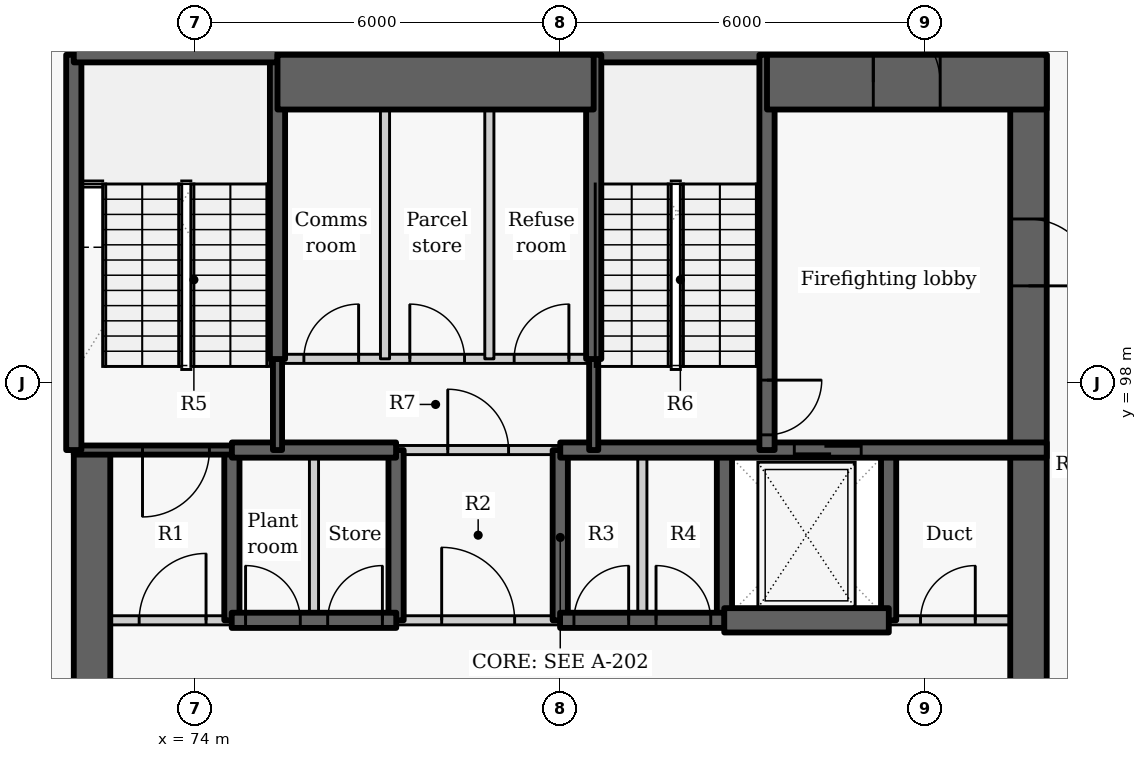
"""IFC4 building model, lengths in metres.
Left out: names, types, materials, properties, quantities, classifications, styles, units other than length and angle.
Written with IfcOpenShell. Run it as: python <this file> out.ifc"""

import sys

from ifc_helpers import new_model, si_unit, direction, frame, frame_2d, origin, place, context, subcontext, project, spatial, rectangle, extrude, element, fill, save


model = new_model("IFC4")
c1 = context("Model", 3, precision=1e-05, world=origin(), true_north=direction((0.0, 1.0)))
c2 = subcontext(c1, "Body", "Model", "MODEL_VIEW")
j1 = project(units=[si_unit("LENGTHUNIT", "METRE"), si_unit("PLANEANGLEUNIT", "RADIAN")], contexts=[c1])
p1 = place(None, origin())
s1 = spatial("IfcSite", under=j1, at=p1, CompositionType="ELEMENT")
p2 = place(p1, origin())
s2 = spatial("IfcBuilding", under=s1, at=p2, CompositionType="ELEMENT")
p3 = place(p2, frame((0.0, 0.0, 6.6)))
s3 = spatial("IfcBuildingStorey", under=s2, at=p3, CompositionType="ELEMENT", Elevation=6.6)
p4 = place(p3, frame((74.6, 94.1, -0.3), z_axis=(0.0, 0.0, 1.0), x_axis=(0.0, 1.0, 0.0)))
e1 = element("IfcWall", 1, at=p4, inside=s3, PredefinedType="SHEAR", context=c2, shape_type="SweptSolid", body=[
    extrude(rectangle(XDim=2.8, YDim=0.25, at=frame_2d((1.4, 0.0))), origin(), (0.0, 0.0, 1.0), 4.8),
])
p5 = place(p3, frame((72.3, 87.8, -0.3), z_axis=(0.0, 0.0, 1.0), x_axis=(0.0, 1.0, 0.0)))
e2 = element("IfcWall", 2, at=p5, inside=s3, PredefinedType="SHEAR", context=c2, shape_type="SweptSolid", body=[
    extrude(rectangle(XDim=9.1, YDim=0.6, at=frame_2d((4.55, 0.0))), origin(), (0.0, 0.0, 1.0), 4.8),
])
for number, where, z_axis, x_axis in (
    (3, (77.3, 94.1, -0.3), (0.0, 0.0, 1.0), (0.0, 1.0, 0.0)),
    (4, (80.0, 94.1, -0.3), (0.0, 0.0, 1.0), (0.0, 1.0, 0.0)),
    (5, (82.7, 94.1, -0.3), (0.0, 0.0, 1.0), (0.0, 1.0, 0.0)),
    (6, (85.4, 94.1, -0.3), (0.0, 0.0, 1.0), (0.0, 1.0, 0.0)),
):
    element("IfcWall", number, at=place(p3, frame(where, z_axis=z_axis, x_axis=x_axis)), inside=s3, PredefinedType="SHEAR", context=c2, shape_type="SweptSolid", body=[
        extrude(rectangle(XDim=2.8, YDim=0.25, at=frame_2d((1.4, 0.0))), origin(), (0.0, 0.0, 1.0), 4.8),
    ])
p6 = place(p3, frame((87.7, 103.4, -0.3), z_axis=(0.0, 0.0, 1.0), x_axis=(0.0, -1.0, 0.0)))
e7 = element("IfcWall", 7, at=p6, inside=s3, PredefinedType="SHEAR", context=c2, shape_type="SweptSolid", body=[
    extrude(rectangle(XDim=15.6, YDim=0.6, at=frame_2d((7.8, 0.0))), origin(), (0.0, 0.0, 1.0), 4.8),
])
p7 = place(p6, frame((2.7, 0.0, 0.3)))
e8 = element("IfcOpeningElement", 8, at=p7, cuts=e7, PredefinedType="OPENING", context=c2, shape_type="SweptSolid", body=[
    extrude(rectangle(XDim=1.1, YDim=2.1, at=frame_2d((0.55, 1.05))), frame((0.0, 0.31, 0.0), z_axis=(0.0, -1.0, 0.0), x_axis=(1.0, 0.0, 0.0)), (0.0, 0.0, 1.0), 0.62),
])
p8 = place(p3, frame((72.0, 94.1, 0.0), z_axis=(0.0, 0.0, 1.0), x_axis=(1.0, 0.0, 0.0)))
e9 = element("IfcWall", 9, at=p8, inside=s3, PredefinedType="PARTITIONING", context=c2, shape_type="SweptSolid", body=[
    extrude(rectangle(XDim=2.603, YDim=0.15, at=frame_2d((1.302, 0.0))), origin(), (0.0, 0.0, 1.0), 4.5),
])
p9 = place(p8, frame((1.075, 0.0, 0.0)))
e10 = element("IfcOpeningElement", 10, at=p9, cuts=e9, PredefinedType="OPENING", context=c2, shape_type="SweptSolid", body=[
    extrude(rectangle(XDim=1.1, YDim=2.1, at=frame_2d((0.55, 1.05))), frame((0.0, 0.085, 0.0), z_axis=(0.0, -1.0, 0.0), x_axis=(1.0, 0.0, 0.0)), (0.0, 0.0, 1.0), 0.17),
])
p10 = place(p3, frame((77.297, 94.1, 0.0), z_axis=(0.0, 0.0, 1.0), x_axis=(1.0, 0.0, 0.0)))
e11 = element("IfcWall", 11, at=p10, inside=s3, PredefinedType="PARTITIONING", context=c2, shape_type="SweptSolid", body=[
    extrude(rectangle(XDim=2.706, YDim=0.15, at=frame_2d((1.353, 0.0))), origin(), (0.0, 0.0, 1.0), 4.5),
])
p11 = place(p10, frame((0.753, 0.0, 0.0)))
e12 = element("IfcOpeningElement", 12, at=p11, cuts=e11, PredefinedType="OPENING", context=c2, shape_type="SweptSolid", body=[
    extrude(rectangle(XDim=1.2, YDim=2.1, at=frame_2d((0.6, 1.05))), frame((0.0, 0.085, 0.0), z_axis=(0.0, -1.0, 0.0), x_axis=(1.0, 0.0, 0.0)), (0.0, 0.0, 1.0), 0.17),
])
p12 = place(p3, frame((85.397, 94.1, 0.0), z_axis=(0.0, 0.0, 1.0), x_axis=(1.0, 0.0, 0.0)))
e13 = element("IfcWall", 13, at=p12, inside=s3, PredefinedType="PARTITIONING", context=c2, shape_type="SweptSolid", body=[
    extrude(rectangle(XDim=2.603, YDim=0.15, at=frame_2d((1.302, 0.0))), origin(), (0.0, 0.0, 1.0), 4.5),
])
p13 = place(p12, frame((0.528, 0.0, 0.0)))
e14 = element("IfcOpeningElement", 14, at=p13, cuts=e13, PredefinedType="OPENING", context=c2, shape_type="SweptSolid", body=[
    extrude(rectangle(XDim=0.9, YDim=2.1, at=frame_2d((0.45, 1.05))), frame((0.0, 0.085, 0.0), z_axis=(0.0, -1.0, 0.0), x_axis=(1.0, 0.0, 0.0)), (0.0, 0.0, 1.0), 0.17),
])
p14 = place(p3, frame((74.597, 94.1, -0.3), z_axis=(0.0, 0.0, 1.0), x_axis=(1.0, 0.0, 0.0)))
e15 = element("IfcWall", 15, at=p14, inside=s3, PredefinedType="SHEAR", context=c2, shape_type="SweptSolid", body=[
    extrude(rectangle(XDim=2.706, YDim=0.25, at=frame_2d((1.353, 0.0))), origin(), (0.0, 0.0, 1.0), 4.8),
])
p15 = place(p14, frame((0.228, 0.0, 0.3)))
e16 = element("IfcOpeningElement", 16, at=p15, cuts=e15, PredefinedType="OPENING", context=c2, shape_type="SweptSolid", body=[
    extrude(rectangle(XDim=0.9, YDim=2.1, at=frame_2d((0.45, 1.05))), frame((0.0, 0.135, 0.0), z_axis=(0.0, -1.0, 0.0), x_axis=(1.0, 0.0, 0.0)), (0.0, 0.0, 1.0), 0.27),
])
p16 = place(p14, frame((1.578, 0.0, 0.3)))
e17 = element("IfcOpeningElement", 17, at=p16, cuts=e15, PredefinedType="OPENING", context=c2, shape_type="SweptSolid", body=[
    extrude(rectangle(XDim=0.9, YDim=2.1, at=frame_2d((0.45, 1.05))), frame((0.0, 0.135, 0.0), z_axis=(0.0, -1.0, 0.0), x_axis=(1.0, 0.0, 0.0)), (0.0, 0.0, 1.0), 0.27),
])
p17 = place(p3, frame((79.997, 94.1, -0.3), z_axis=(0.0, 0.0, 1.0), x_axis=(1.0, 0.0, 0.0)))
e18 = element("IfcWall", 18, at=p17, inside=s3, PredefinedType="SHEAR", context=c2, shape_type="SweptSolid", body=[
    extrude(rectangle(XDim=2.706, YDim=0.25, at=frame_2d((1.353, 0.0))), origin(), (0.0, 0.0, 1.0), 4.8),
])
p18 = place(p17, frame((0.228, 0.0, 0.3)))
e19 = element("IfcOpeningElement", 19, at=p18, cuts=e18, PredefinedType="OPENING", context=c2, shape_type="SweptSolid", body=[
    extrude(rectangle(XDim=0.9, YDim=2.1, at=frame_2d((0.45, 1.05))), frame((0.0, 0.135, 0.0), z_axis=(0.0, -1.0, 0.0), x_axis=(1.0, 0.0, 0.0)), (0.0, 0.0, 1.0), 0.27),
])
p19 = place(p17, frame((1.578, 0.0, 0.3)))
e20 = element("IfcOpeningElement", 20, at=p19, cuts=e18, PredefinedType="OPENING", context=c2, shape_type="SweptSolid", body=[
    extrude(rectangle(XDim=0.9, YDim=2.1, at=frame_2d((0.45, 1.05))), frame((0.0, 0.135, 0.0), z_axis=(0.0, -1.0, 0.0), x_axis=(1.0, 0.0, 0.0)), (0.0, 0.0, 1.0), 0.27),
])
p20 = place(p3, frame((82.697, 94.1, -0.3), z_axis=(0.0, 0.0, 1.0), x_axis=(1.0, 0.0, 0.0)))
e21 = element("IfcWall", 21, at=p20, inside=s3, PredefinedType="SHEAR", context=c2, shape_type="SweptSolid", body=[
    extrude(rectangle(XDim=2.706, YDim=0.4, at=frame_2d((1.353, 0.0))), origin(), (0.0, 0.0, 1.0), 4.8),
])
p21 = place(p3, frame((74.6, 96.9, -0.3), z_axis=(0.0, 0.0, 1.0), x_axis=(-1.0, 0.0, 0.0)))
e22 = element("IfcWall", 22, at=p21, inside=s3, PredefinedType="SHEAR", context=c2, shape_type="SweptSolid", body=[
    extrude(rectangle(XDim=2.6, YDim=0.15, at=frame_2d((1.3, 0.0))), origin(), (0.0, 0.0, 1.0), 4.8),
])
p22 = place(p21, frame((0.37, 0.0, 0.3)))
e23 = element("IfcOpeningElement", 23, at=p22, cuts=e22, PredefinedType="OPENING", context=c2, shape_type="SweptSolid", body=[
    extrude(rectangle(XDim=1.1, YDim=2.1, at=frame_2d((0.55, 1.05))), frame((0.0, 0.085, 0.0), z_axis=(0.0, -1.0, 0.0), x_axis=(1.0, 0.0, 0.0)), (0.0, 0.0, 1.0), 0.17),
])
p23 = place(p3, frame((75.95, 94.1, 0.0), z_axis=(0.0, 0.0, 1.0), x_axis=(0.0, 1.0, 0.0)))
e24 = element("IfcWall", 24, at=p23, inside=s3, PredefinedType="PARTITIONING", context=c2, shape_type="SweptSolid", body=[
    extrude(rectangle(XDim=2.8, YDim=0.15, at=frame_2d((1.4, 0.0))), origin(), (0.0, 0.0, 1.0), 4.5),
])
p24 = place(p3, frame((74.6, 96.9, -0.3), z_axis=(0.0, 0.0, 1.0), x_axis=(1.0, 0.0, 0.0)))
e25 = element("IfcWall", 25, at=p24, inside=s3, PredefinedType="SHEAR", context=c2, shape_type="SweptSolid", body=[
    extrude(rectangle(XDim=2.7, YDim=0.25, at=frame_2d((1.35, 0.0))), origin(), (0.0, 0.0, 1.0), 4.8),
])
p25 = place(p3, frame((80.0, 96.9, -0.3), z_axis=(0.0, 0.0, 1.0), x_axis=(1.0, 0.0, 0.0)))
e26 = element("IfcWall", 26, at=p25, inside=s3, PredefinedType="SHEAR", context=c2, shape_type="SweptSolid", body=[
    extrude(rectangle(XDim=8.0, YDim=0.25, at=frame_2d((4.0, 0.0))), origin(), (0.0, 0.0, 1.0), 4.8),
])
p26 = place(p25, frame((3.849, 0.0, 0.3)))
e27 = element("IfcOpeningElement", 27, at=p26, cuts=e26, PredefinedType="OPENING", context=c2, shape_type="SweptSolid", body=[
    extrude(rectangle(XDim=1.1, YDim=2.1, at=frame_2d((0.55, 1.05))), frame((0.0, 0.135, 0.0), z_axis=(0.0, -1.0, 0.0), x_axis=(1.0, 0.0, 0.0)), (0.0, 0.0, 1.0), 0.27),
])
p27 = place(p3, frame((77.3, 96.9, 0.0), z_axis=(0.0, 0.0, 1.0), x_axis=(1.0, 0.0, 0.0)))
e28 = element("IfcWall", 28, at=p27, inside=s3, PredefinedType="PARTITIONING", context=c2, shape_type="SweptSolid", body=[
    extrude(rectangle(XDim=2.7, YDim=0.15, at=frame_2d((1.35, 0.0))), origin(), (0.0, 0.0, 1.0), 4.5),
])
p28 = place(p27, frame((0.85, 0.0, 0.0)))
e29 = element("IfcOpeningElement", 29, at=p28, cuts=e28, PredefinedType="OPENING", context=c2, shape_type="SweptSolid", body=[
    extrude(rectangle(XDim=1.0, YDim=2.1, at=frame_2d((0.5, 1.05))), frame((0.0, 0.085, 0.0), z_axis=(0.0, -1.0, 0.0), x_axis=(1.0, 0.0, 0.0)), (0.0, 0.0, 1.0), 0.17),
])
p29 = place(p3, frame((81.35, 94.1, 0.0), z_axis=(0.0, 0.0, 1.0), x_axis=(0.0, 1.0, 0.0)))
e30 = element("IfcWall", 30, at=p29, inside=s3, PredefinedType="PARTITIONING", context=c2, shape_type="SweptSolid", body=[
    extrude(rectangle(XDim=2.8, YDim=0.15, at=frame_2d((1.4, 0.0))), origin(), (0.0, 0.0, 1.0), 4.5),
])
p30 = place(p3, frame((75.35, 96.9, -0.3), z_axis=(0.0, 0.0, 1.0), x_axis=(0.0, 1.0, 0.0)))
e31 = element("IfcWall", 31, at=p30, inside=s3, PredefinedType="SHEAR", context=c2, shape_type="SweptSolid", body=[
    extrude(rectangle(XDim=1.503, YDim=0.15, at=frame_2d((0.751, 0.0))), origin(), (0.0, 0.0, 1.0), 4.8),
])
p31 = place(p3, frame((75.35, 98.397, -0.3), z_axis=(0.0, 0.0, 1.0), x_axis=(0.0, 1.0, 0.0)))
e32 = element("IfcWall", 32, at=p31, inside=s3, PredefinedType="SHEAR", context=c2, shape_type="SweptSolid", body=[
    extrude(rectangle(XDim=5.003, YDim=0.25, at=frame_2d((2.501, 0.0))), origin(), (0.0, 0.0, 1.0), 4.8),
])
p32 = place(p3, frame((72.0, 96.9, -0.3), z_axis=(0.0, 0.0, 1.0), x_axis=(0.0, 1.0, 0.0)))
e33 = element("IfcWall", 33, at=p32, inside=s3, PredefinedType="SHEAR", context=c2, shape_type="SweptSolid", body=[
    extrude(rectangle(XDim=6.5, YDim=0.25, at=frame_2d((3.25, 0.0))), origin(), (0.0, 0.0, 1.0), 4.8),
])
p33 = place(p3, frame((72.0, 103.4, -0.3), z_axis=(0.0, 0.0, 1.0), x_axis=(1.0, 0.0, 0.0)))
e34 = element("IfcWall", 34, at=p33, inside=s3, PredefinedType="SHEAR", context=c2, shape_type="SweptSolid", body=[
    extrude(rectangle(XDim=3.35, YDim=0.25, at=frame_2d((1.675, 0.0))), origin(), (0.0, 0.0, 1.0), 4.8),
])
p34 = place(p3, frame((80.55, 103.4, -0.3), z_axis=(0.0, 0.0, 1.0), x_axis=(1.0, 0.0, 0.0)))
e35 = element("IfcWall", 35, at=p34, inside=s3, PredefinedType="SHEAR", context=c2, shape_type="SweptSolid", body=[
    extrude(rectangle(XDim=2.85, YDim=0.25, at=frame_2d((1.425, 0.0))), origin(), (0.0, 0.0, 1.0), 4.8),
])
p35 = place(p3, frame((83.4, 103.4, -0.3), z_axis=(0.0, 0.0, 1.0), x_axis=(0.0, -1.0, 0.0)))
e36 = element("IfcWall", 36, at=p35, inside=s3, PredefinedType="SHEAR", context=c2, shape_type="SweptSolid", body=[
    extrude(rectangle(XDim=6.5, YDim=0.25, at=frame_2d((3.25, 0.0))), origin(), (0.0, 0.0, 1.0), 4.8),
])
p36 = place(p35, frame((5.35, 0.0, 0.3)))
e37 = element("IfcOpeningElement", 37, at=p36, cuts=e36, PredefinedType="OPENING", context=c2, shape_type="SweptSolid", body=[
    extrude(rectangle(XDim=0.9, YDim=2.1, at=frame_2d((0.45, 1.05))), frame((0.0, 0.135, 0.0), z_axis=(0.0, -1.0, 0.0), x_axis=(1.0, 0.0, 0.0)), (0.0, 0.0, 1.0), 0.27),
])
p37 = place(p3, frame((80.55, 96.9, -0.3), z_axis=(0.0, 0.0, 1.0), x_axis=(0.0, 1.0, 0.0)))
e38 = element("IfcWall", 38, at=p37, inside=s3, PredefinedType="SHEAR", context=c2, shape_type="SweptSolid", body=[
    extrude(rectangle(XDim=1.503, YDim=0.15, at=frame_2d((0.751, 0.0))), origin(), (0.0, 0.0, 1.0), 4.8),
])
p38 = place(p3, frame((80.55, 98.397, -0.3), z_axis=(0.0, 0.0, 1.0), x_axis=(0.0, 1.0, 0.0)))
e39 = element("IfcWall", 39, at=p38, inside=s3, PredefinedType="SHEAR", context=c2, shape_type="SweptSolid", body=[
    extrude(rectangle(XDim=5.003, YDim=0.25, at=frame_2d((2.501, 0.0))), origin(), (0.0, 0.0, 1.0), 4.8),
])
p39 = place(p3, frame((75.35, 102.95, -0.3), z_axis=(0.0, 0.0, 1.0), x_axis=(1.0, 0.0, 0.0)))
e40 = element("IfcWall", 40, at=p39, inside=s3, PredefinedType="SHEAR", context=c2, shape_type="SweptSolid", body=[
    extrude(rectangle(XDim=5.2, YDim=0.9, at=frame_2d((2.6, 0.0))), origin(), (0.0, 0.0, 1.0), 4.8),
])
p40 = place(p3, frame((83.4, 102.95, -0.3), z_axis=(0.0, 0.0, 1.0), x_axis=(1.0, 0.0, 0.0)))
e41 = element("IfcWall", 41, at=p40, inside=s3, PredefinedType="SHEAR", context=c2, shape_type="SweptSolid", body=[
    extrude(rectangle(XDim=4.6, YDim=0.9, at=frame_2d((2.3, 0.0))), origin(), (0.0, 0.0, 1.0), 4.8),
])
p41 = place(p40, frame((1.748, 0.0, 0.3)))
e42 = element("IfcOpeningElement", 42, at=p41, cuts=e41, PredefinedType="OPENING", context=c2, shape_type="SweptSolid", body=[
    extrude(rectangle(XDim=1.1, YDim=2.1, at=frame_2d((0.55, 1.05))), frame((0.0, 0.46, 0.0), z_axis=(0.0, -1.0, 0.0), x_axis=(1.0, 0.0, 0.0)), (0.0, 0.0, 1.0), 0.92),
])
p42 = place(p3, frame((75.35, 98.4, 0.0), z_axis=(0.0, 0.0, 1.0), x_axis=(1.0, 0.0, 0.0)))
e43 = element("IfcWall", 43, at=p42, inside=s3, PredefinedType="PARTITIONING", context=c2, shape_type="SweptSolid", body=[
    extrude(rectangle(XDim=5.2, YDim=0.15, at=frame_2d((2.6, 0.0))), origin(), (0.0, 0.0, 1.0), 4.5),
])
p43 = place(p42, frame((0.434, 0.0, 0.0)))
e44 = element("IfcOpeningElement", 44, at=p43, cuts=e43, PredefinedType="OPENING", context=c2, shape_type="SweptSolid", body=[
    extrude(rectangle(XDim=0.9, YDim=2.1, at=frame_2d((0.45, 1.05))), frame((0.0, 0.085, 0.0), z_axis=(0.0, -1.0, 0.0), x_axis=(1.0, 0.0, 0.0)), (0.0, 0.0, 1.0), 0.17),
])
p44 = place(p42, frame((2.176, 0.0, 0.0)))
e45 = element("IfcOpeningElement", 45, at=p44, cuts=e43, PredefinedType="OPENING", context=c2, shape_type="SweptSolid", body=[
    extrude(rectangle(XDim=0.9, YDim=2.1, at=frame_2d((0.45, 1.05))), frame((0.0, 0.085, 0.0), z_axis=(0.0, -1.0, 0.0), x_axis=(1.0, 0.0, 0.0)), (0.0, 0.0, 1.0), 0.17),
])
p45 = place(p42, frame((3.892, 0.0, 0.0)))
e46 = element("IfcOpeningElement", 46, at=p45, cuts=e43, PredefinedType="OPENING", context=c2, shape_type="SweptSolid", body=[
    extrude(rectangle(XDim=0.9, YDim=2.1, at=frame_2d((0.45, 1.05))), frame((0.0, 0.085, 0.0), z_axis=(0.0, -1.0, 0.0), x_axis=(1.0, 0.0, 0.0)), (0.0, 0.0, 1.0), 0.17),
])
for number, where, z_axis, x_axis in (
    (47, (77.118, 98.4, 0.0), (0.0, 0.0, 1.0), (0.0, 1.0, 0.0)),
    (48, (78.834, 98.4, 0.0), (0.0, 0.0, 1.0), (0.0, 1.0, 0.0)),
):
    element("IfcWall", number, at=place(p3, frame(where, z_axis=z_axis, x_axis=x_axis)), inside=s3, PredefinedType="PARTITIONING", context=c2, shape_type="SweptSolid", body=[
        extrude(rectangle(XDim=5.0, YDim=0.15, at=frame_2d((2.5, 0.0))), origin(), (0.0, 0.0, 1.0), 4.5),
    ])
p46 = place(p9, origin())
e49 = element("IfcDoor", 49, at=p46, inside=s3, OperationType="SINGLE_SWING_RIGHT", PredefinedType="DOOR", context=c2, shape_type="SweptSolid", body=[
    extrude(rectangle(XDim=1.1, YDim=2.1, at=frame_2d((0.55, 1.05))), frame((0.0, 0.025, 0.0), z_axis=(0.0, -1.0, 0.0), x_axis=(1.0, 0.0, 0.0)), (0.0, 0.0, 1.0), 0.05),
])
fill(e10, e49)
p47 = place(p15, origin())
e50 = element("IfcDoor", 50, at=p47, inside=s3, OperationType="SINGLE_SWING_LEFT", PredefinedType="DOOR", context=c2, shape_type="SweptSolid", body=[
    extrude(rectangle(XDim=0.9, YDim=2.1, at=frame_2d((0.45, 1.05))), frame((0.0, 0.025, 0.0), z_axis=(0.0, -1.0, 0.0), x_axis=(1.0, 0.0, 0.0)), (0.0, 0.0, 1.0), 0.05),
])
fill(e16, e50)
p48 = place(p16, origin())
e51 = element("IfcDoor", 51, at=p48, inside=s3, OperationType="SINGLE_SWING_RIGHT", PredefinedType="DOOR", context=c2, shape_type="SweptSolid", body=[
    extrude(rectangle(XDim=0.9, YDim=2.1, at=frame_2d((0.45, 1.05))), frame((0.0, 0.025, 0.0), z_axis=(0.0, -1.0, 0.0), x_axis=(1.0, 0.0, 0.0)), (0.0, 0.0, 1.0), 0.05),
])
fill(e17, e51)
p49 = place(p11, origin())
e52 = element("IfcDoor", 52, at=p49, inside=s3, OperationType="DOUBLE_DOOR_SINGLE_SWING", PredefinedType="DOOR", context=c2, shape_type="SweptSolid", body=[
    extrude(rectangle(XDim=1.2, YDim=2.1, at=frame_2d((0.6, 1.05))), frame((0.0, 0.025, 0.0), z_axis=(0.0, -1.0, 0.0), x_axis=(1.0, 0.0, 0.0)), (0.0, 0.0, 1.0), 0.05),
])
fill(e12, e52)
p50 = place(p18, origin())
e53 = element("IfcDoor", 53, at=p50, inside=s3, OperationType="SINGLE_SWING_RIGHT", PredefinedType="DOOR", context=c2, shape_type="SweptSolid", body=[
    extrude(rectangle(XDim=0.9, YDim=2.1, at=frame_2d((0.45, 1.05))), frame((0.0, 0.025, 0.0), z_axis=(0.0, -1.0, 0.0), x_axis=(1.0, 0.0, 0.0)), (0.0, 0.0, 1.0), 0.05),
])
fill(e19, e53)
p51 = place(p19, origin())
e54 = element("IfcDoor", 54, at=p51, inside=s3, OperationType="SINGLE_SWING_LEFT", PredefinedType="DOOR", context=c2, shape_type="SweptSolid", body=[
    extrude(rectangle(XDim=0.9, YDim=2.1, at=frame_2d((0.45, 1.05))), frame((0.0, 0.025, 0.0), z_axis=(0.0, -1.0, 0.0), x_axis=(1.0, 0.0, 0.0)), (0.0, 0.0, 1.0), 0.05),
])
fill(e20, e54)
p52 = place(p26, origin())
e55 = element("IfcDoor", 55, at=p52, inside=s3, OperationType="SLIDING_TO_LEFT", PredefinedType="DOOR", context=c2, shape_type="SweptSolid", body=[
    extrude(rectangle(XDim=1.1, YDim=2.1, at=frame_2d((0.55, 1.05))), frame((0.0, 0.025, 0.0), z_axis=(0.0, -1.0, 0.0), x_axis=(1.0, 0.0, 0.0)), (0.0, 0.0, 1.0), 0.05),
])
fill(e27, e55)
p53 = place(p13, origin())
e56 = element("IfcDoor", 56, at=p53, inside=s3, OperationType="SINGLE_SWING_RIGHT", PredefinedType="DOOR", context=c2, shape_type="SweptSolid", body=[
    extrude(rectangle(XDim=0.9, YDim=2.1, at=frame_2d((0.45, 1.05))), frame((0.0, 0.025, 0.0), z_axis=(0.0, -1.0, 0.0), x_axis=(1.0, 0.0, 0.0)), (0.0, 0.0, 1.0), 0.05),
])
fill(e14, e56)
p54 = place(p28, origin())
e57 = element("IfcDoor", 57, at=p54, inside=s3, OperationType="SINGLE_SWING_LEFT", PredefinedType="DOOR", context=c2, shape_type="SweptSolid", body=[
    extrude(rectangle(XDim=1.0, YDim=2.1, at=frame_2d((0.5, 1.05))), frame((0.0, 0.025, 0.0), z_axis=(0.0, -1.0, 0.0), x_axis=(1.0, 0.0, 0.0)), (0.0, 0.0, 1.0), 0.05),
])
fill(e29, e57)
p55 = place(p43, origin())
e58 = element("IfcDoor", 58, at=p55, inside=s3, OperationType="SINGLE_SWING_RIGHT", PredefinedType="DOOR", context=c2, shape_type="SweptSolid", body=[
    extrude(rectangle(XDim=0.9, YDim=2.1, at=frame_2d((0.45, 1.05))), frame((0.0, 0.025, 0.0), z_axis=(0.0, -1.0, 0.0), x_axis=(1.0, 0.0, 0.0)), (0.0, 0.0, 1.0), 0.05),
])
fill(e44, e58)
p56 = place(p44, origin())
e59 = element("IfcDoor", 59, at=p56, inside=s3, OperationType="SINGLE_SWING_LEFT", PredefinedType="DOOR", context=c2, shape_type="SweptSolid", body=[
    extrude(rectangle(XDim=0.9, YDim=2.1, at=frame_2d((0.45, 1.05))), frame((0.0, 0.025, 0.0), z_axis=(0.0, -1.0, 0.0), x_axis=(1.0, 0.0, 0.0)), (0.0, 0.0, 1.0), 0.05),
])
fill(e45, e59)
p57 = place(p45, origin())
e60 = element("IfcDoor", 60, at=p57, inside=s3, OperationType="SINGLE_SWING_RIGHT", PredefinedType="DOOR", context=c2, shape_type="SweptSolid", body=[
    extrude(rectangle(XDim=0.9, YDim=2.1, at=frame_2d((0.45, 1.05))), frame((0.0, 0.025, 0.0), z_axis=(0.0, -1.0, 0.0), x_axis=(1.0, 0.0, 0.0)), (0.0, 0.0, 1.0), 0.05),
])
fill(e46, e60)
p58 = place(p22, origin())
e61 = element("IfcDoor", 61, at=p58, inside=s3, OperationType="SINGLE_SWING_RIGHT", PredefinedType="DOOR", context=c2, shape_type="SweptSolid", body=[
    extrude(rectangle(XDim=1.1, YDim=2.1, at=frame_2d((0.55, 1.05))), frame((0.0, 0.025, 0.0), z_axis=(0.0, -1.0, 0.0), x_axis=(1.0, 0.0, 0.0)), (0.0, 0.0, 1.0), 0.05),
])
fill(e23, e61)
p59 = place(p36, origin())
e62 = element("IfcDoor", 62, at=p59, inside=s3, OperationType="SINGLE_SWING_LEFT", PredefinedType="DOOR", context=c2, shape_type="SweptSolid", body=[
    extrude(rectangle(XDim=0.9, YDim=2.1, at=frame_2d((0.45, 1.05))), frame((0.0, 0.025, 0.0), z_axis=(0.0, -1.0, 0.0), x_axis=(1.0, 0.0, 0.0)), (0.0, 0.0, 1.0), 0.05),
])
fill(e37, e62)
p60 = place(p7, origin())
e63 = element("IfcDoor", 63, at=p60, inside=s3, OperationType="SINGLE_SWING_RIGHT", PredefinedType="DOOR", context=c2, shape_type="SweptSolid", body=[
    extrude(rectangle(XDim=1.1, YDim=2.1, at=frame_2d((0.55, 1.05))), frame((0.0, 0.025, 0.0), z_axis=(0.0, -1.0, 0.0), x_axis=(1.0, 0.0, 0.0)), (0.0, 0.0, 1.0), 0.05),
])
fill(e8, e63)
p61 = place(p41, origin())
e64 = element("IfcDoor", 64, at=p61, inside=s3, OperationType="SINGLE_SWING_LEFT", PredefinedType="DOOR", context=c2, shape_type="SweptSolid", body=[
    extrude(rectangle(XDim=1.1, YDim=2.1, at=frame_2d((0.55, 1.05))), frame((0.0, 0.025, 0.0), z_axis=(0.0, -1.0, 0.0), x_axis=(1.0, 0.0, 0.0)), (0.0, 0.0, 1.0), 0.05),
])
fill(e42, e64)
save(model, sys.argv[1])
